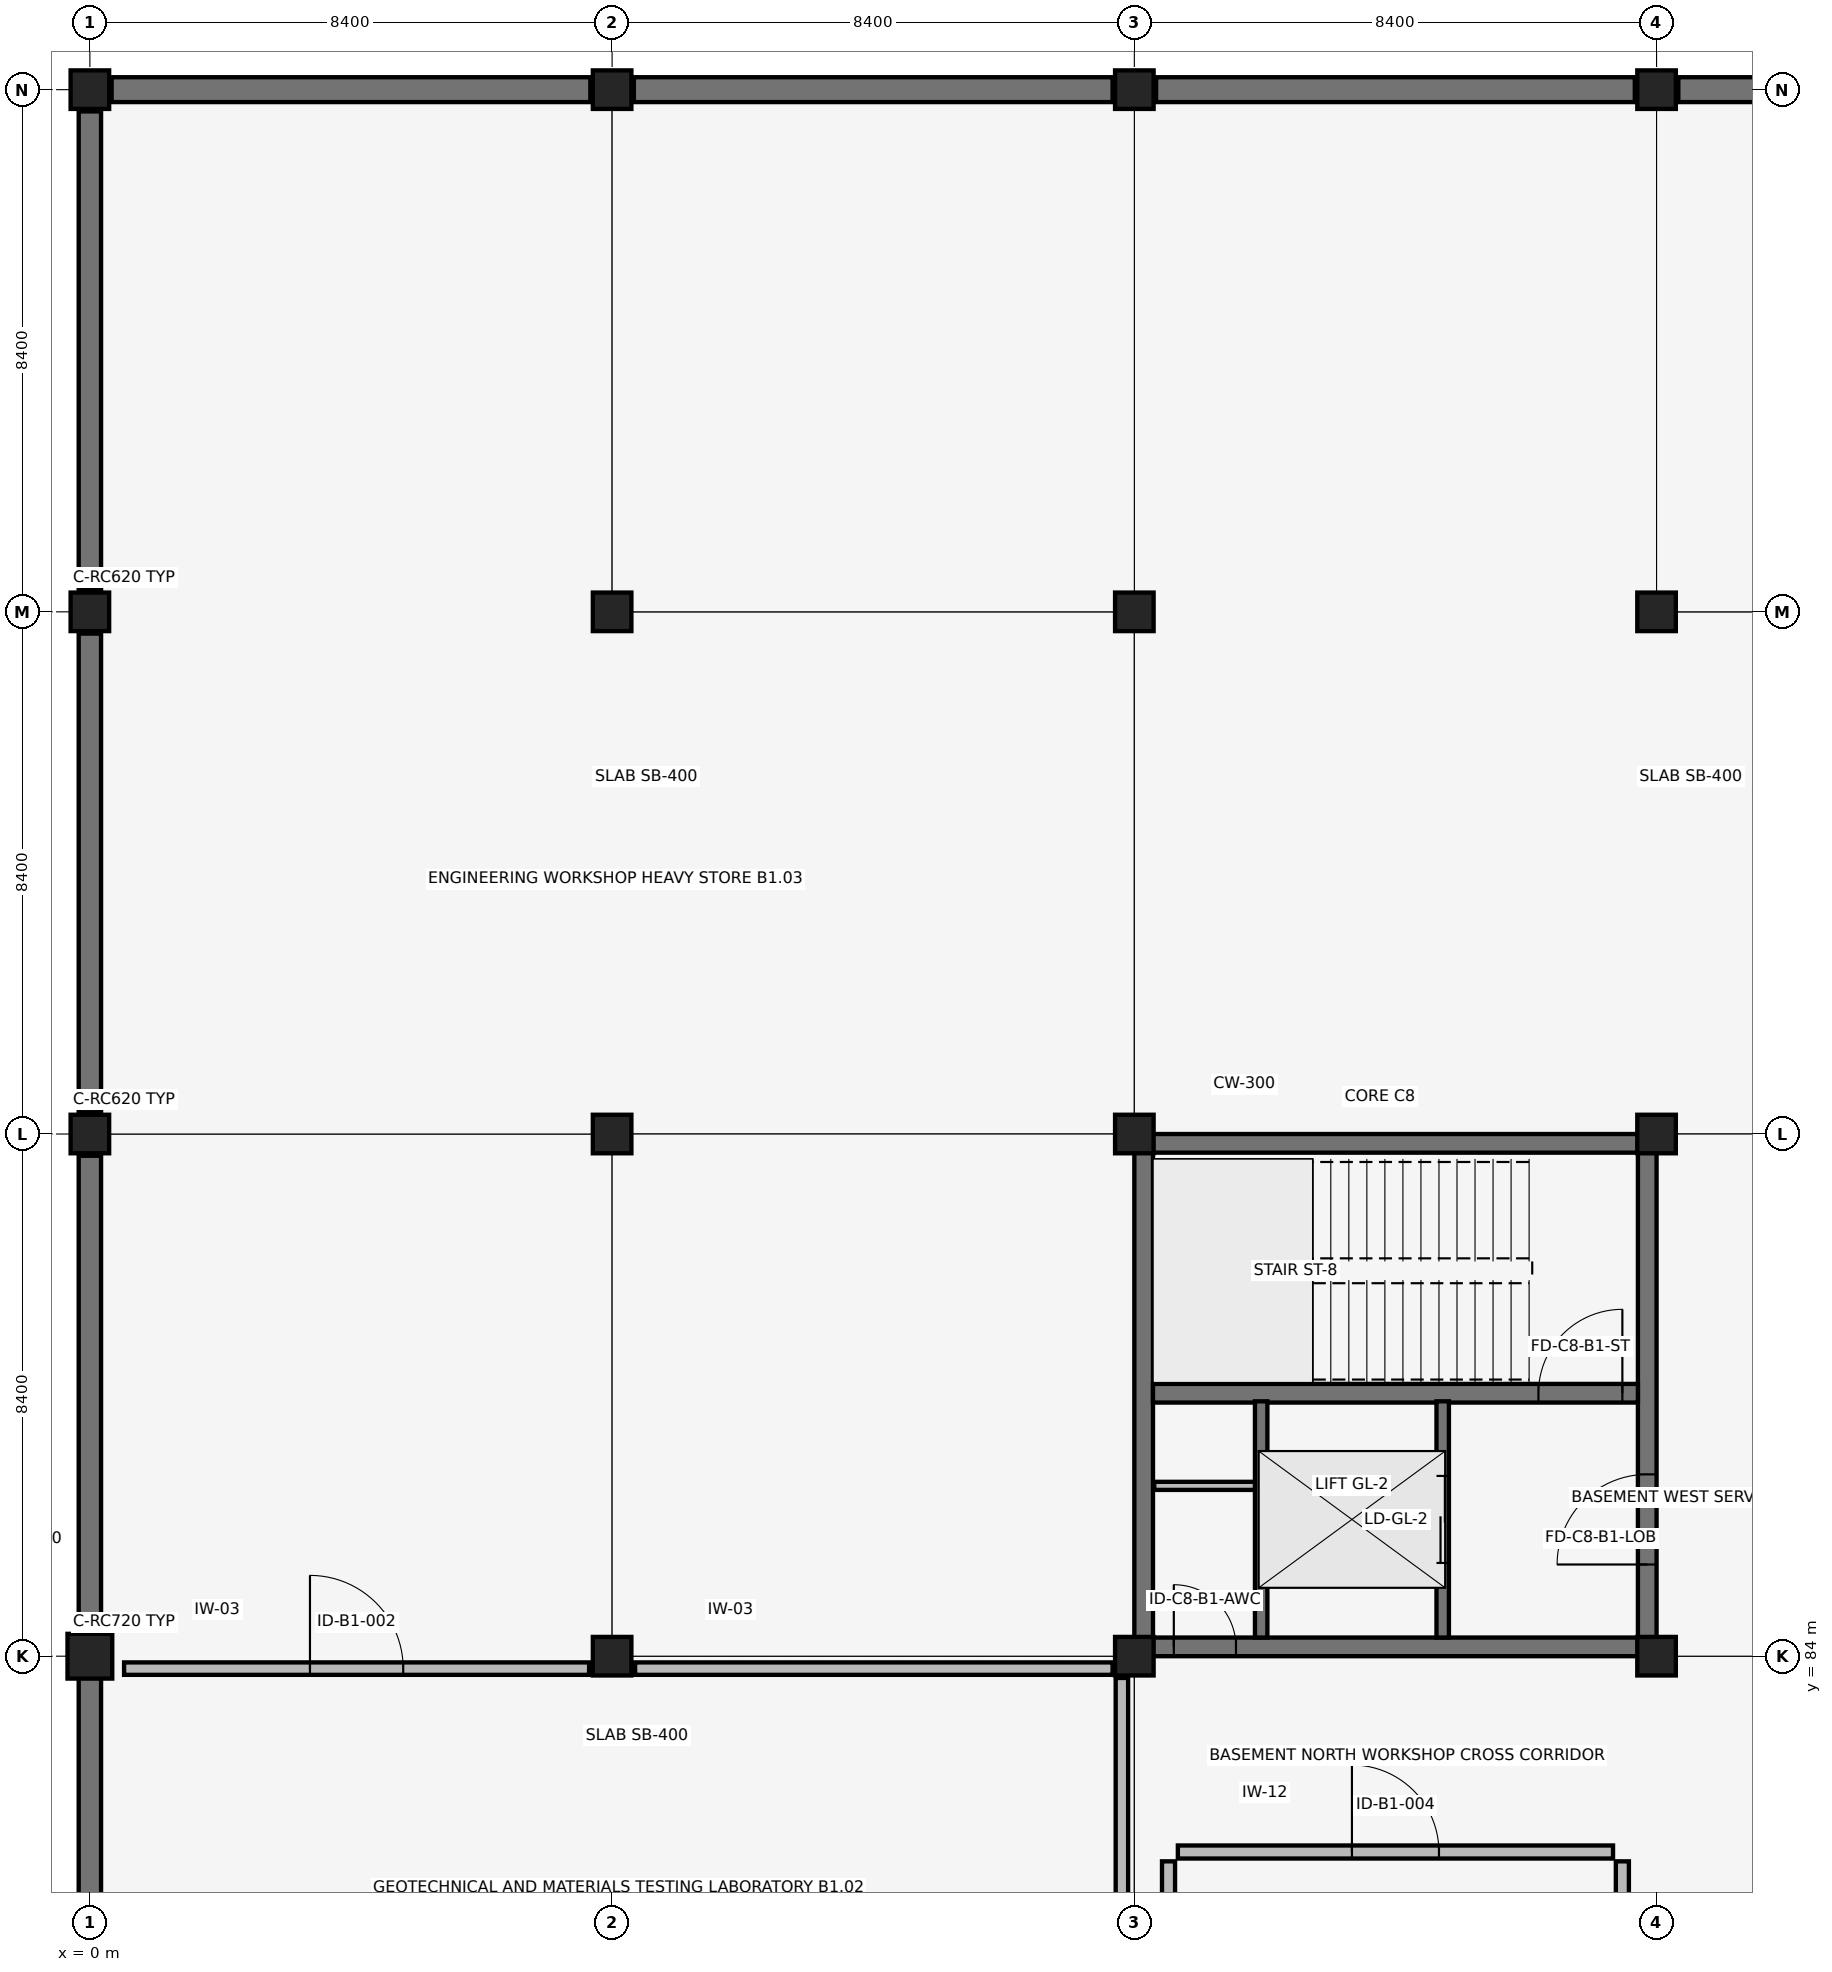
"""IFC4 building model, lengths in metres.
Left out: names, types, materials, properties, quantities, classifications, styles, units other than length and angle.
Written with IfcOpenShell. Run it as: python <this file> out.ifc"""

import sys

from ifc_helpers import new_model, si_unit, direction, frame, frame_2d, origin, origin_2d, place, context, subcontext, project, spatial, rectangle, extrude, element, fill, save


model = new_model("IFC4")
c1 = context("Model", 3, precision=1e-05, world=origin(), true_north=direction((0.0, 1.0)))
c2 = subcontext(c1, "Body", "Model", "MODEL_VIEW")
j1 = project(units=[si_unit("LENGTHUNIT", "METRE"), si_unit("PLANEANGLEUNIT", "RADIAN")], contexts=[c1])
p1 = place(None, origin())
s1 = spatial("IfcSite", under=j1, at=p1, CompositionType="ELEMENT")
p2 = place(p1, origin())
s2 = spatial("IfcBuilding", under=s1, at=p2, CompositionType="ELEMENT")
p3 = place(p2, frame((0.0, 0.0, -4.42)))
s3 = spatial("IfcBuildingStorey", under=s2, at=p3, CompositionType="ELEMENT", Elevation=-4.42)
for number, where, z_axis, x_axis in (
    (1, (0.0, 75.95, 0.0), (0.0, 0.0, 1.0), (0.0, 1.0, 0.0)),
    (2, (0.0, 84.35, 0.0), (0.0, 0.0, 1.0), (0.0, 1.0, 0.0)),
    (3, (0.0, 92.75, 0.0), (0.0, 0.0, 1.0), (0.0, 1.0, 0.0)),
):
    element("IfcWall", number, at=place(p3, frame(where, z_axis=z_axis, x_axis=x_axis)), inside=s3, PredefinedType="USERDEFINED", context=c2, shape_type="SweptSolid", body=[
        extrude(rectangle(XDim=7.7, YDim=0.36, at=frame_2d((3.85, 0.0))), origin(), (0.0, 0.0, 1.0), 4.12),
    ])
p4 = place(p3, frame((0.35, 109.2, 0.0), z_axis=(0.0, 0.0, 1.0), x_axis=(1.0, 0.0, 0.0)))
e4 = element("IfcWall", 4, at=p4, inside=s3, PredefinedType="USERDEFINED", context=c2, shape_type="SweptSolid", body=[
    extrude(rectangle(XDim=7.7, YDim=0.4, at=frame_2d((3.85, 0.0))), origin(), (0.0, 0.0, 1.0), 4.12),
])
p5 = place(p3, frame((0.0, 101.15, 0.0), z_axis=(0.0, 0.0, 1.0), x_axis=(0.0, 1.0, 0.0)))
e5 = element("IfcWall", 5, at=p5, inside=s3, PredefinedType="USERDEFINED", context=c2, shape_type="SweptSolid", body=[
    extrude(rectangle(XDim=7.7, YDim=0.36, at=frame_2d((3.85, 0.0))), origin(), (0.0, 0.0, 1.0), 4.12),
])
p6 = place(p3, frame((8.75, 109.2, 0.0), z_axis=(0.0, 0.0, 1.0), x_axis=(1.0, 0.0, 0.0)))
e6 = element("IfcWall", 6, at=p6, inside=s3, PredefinedType="USERDEFINED", context=c2, shape_type="SweptSolid", body=[
    extrude(rectangle(XDim=7.7, YDim=0.4, at=frame_2d((3.85, 0.0))), origin(), (0.0, 0.0, 1.0), 4.12),
])
p7 = place(p3, frame((17.15, 109.2, 0.0), z_axis=(0.0, 0.0, 1.0), x_axis=(1.0, 0.0, 0.0)))
e7 = element("IfcWall", 7, at=p7, inside=s3, PredefinedType="USERDEFINED", context=c2, shape_type="SweptSolid", body=[
    extrude(rectangle(XDim=7.7, YDim=0.4, at=frame_2d((3.85, 0.0))), origin(), (0.0, 0.0, 1.0), 4.12),
])
p8 = place(p3, frame((25.55, 109.2, 0.0), z_axis=(0.0, 0.0, 1.0), x_axis=(1.0, 0.0, 0.0)))
e8 = element("IfcWall", 8, at=p8, inside=s3, PredefinedType="USERDEFINED", context=c2, shape_type="SweptSolid", body=[
    extrude(rectangle(XDim=7.7, YDim=0.4, at=frame_2d((3.85, 0.0))), origin(), (0.0, 0.0, 1.0), 4.12),
])
p9 = place(p3, frame((16.95, 84.15, 0.0), z_axis=(0.0, 0.0, 1.0), x_axis=(1.0, 0.0, 0.0)))
e9 = element("IfcWall", 9, at=p9, inside=s3, PredefinedType="SHEAR", context=c2, shape_type="SweptSolid", body=[
    extrude(rectangle(XDim=8.1, YDim=0.3, at=frame_2d((4.05, 0.0))), origin(), (0.0, 0.0, 1.0), 4.12),
])
p10 = place(p9, frame((0.485, 0.0, 0.0)))
e10 = element("IfcOpeningElement", 10, at=p10, cuts=e9, PredefinedType="OPENING", context=c2, shape_type="SweptSolid", body=[
    extrude(rectangle(XDim=1.0, YDim=2.15, at=frame_2d((0.5, 1.075))), frame((0.0, 0.16, 0.0), z_axis=(0.0, -1.0, 0.0), x_axis=(1.0, 0.0, 0.0)), (0.0, 0.0, 1.0), 0.32),
])
for number, where, z_axis, x_axis in (
    (11, (16.95, 92.25, 0.0), (0.0, 0.0, 1.0), (1.0, 0.0, 0.0)),
    (12, (16.95, 84.15, 0.0), (0.0, 0.0, 1.0), (0.0, 1.0, 0.0)),
):
    element("IfcWall", number, at=place(p3, frame(where, z_axis=z_axis, x_axis=x_axis)), inside=s3, PredefinedType="SHEAR", context=c2, shape_type="SweptSolid", body=[
        extrude(rectangle(XDim=8.1, YDim=0.3, at=frame_2d((4.05, 0.0))), origin(), (0.0, 0.0, 1.0), 4.12),
    ])
p11 = place(p3, frame((25.05, 84.15, 0.0), z_axis=(0.0, 0.0, 1.0), x_axis=(0.0, 1.0, 0.0)))
e13 = element("IfcWall", 13, at=p11, inside=s3, PredefinedType="SHEAR", context=c2, shape_type="SweptSolid", body=[
    extrude(rectangle(XDim=8.1, YDim=0.3, at=frame_2d((4.05, 0.0))), origin(), (0.0, 0.0, 1.0), 4.12),
])
p12 = place(p11, frame((1.325, 0.0, 0.0)))
e14 = element("IfcOpeningElement", 14, at=p12, cuts=e13, PredefinedType="OPENING", context=c2, shape_type="SweptSolid", body=[
    extrude(rectangle(XDim=1.45, YDim=2.15, at=frame_2d((0.725, 1.075))), frame((0.0, 0.16, 0.0), z_axis=(0.0, -1.0, 0.0), x_axis=(1.0, 0.0, 0.0)), (0.0, 0.0, 1.0), 0.32),
])
p13 = place(p3, frame((17.1, 88.23, 0.0), z_axis=(0.0, 0.0, 1.0), x_axis=(1.0, 0.0, 0.0)))
e15 = element("IfcWall", 15, at=p13, inside=s3, PredefinedType="SHEAR", context=c2, shape_type="SweptSolid", body=[
    extrude(rectangle(XDim=7.8, YDim=0.3, at=frame_2d((3.9, 0.0))), origin(), (0.0, 0.0, 1.0), 4.12),
])
p14 = place(p13, frame((6.2, 0.0, 0.0)))
e16 = element("IfcOpeningElement", 16, at=p14, cuts=e15, PredefinedType="OPENING", context=c2, shape_type="SweptSolid", body=[
    extrude(rectangle(XDim=1.35, YDim=2.15, at=frame_2d((0.675, 1.075))), frame((0.0, 0.16, 0.0), z_axis=(0.0, -1.0, 0.0), x_axis=(1.0, 0.0, 0.0)), (0.0, 0.0, 1.0), 0.32),
])
p15 = place(p3, frame((0.0, 84.0, -0.4), z_axis=(0.0, 0.0, 1.0), x_axis=(1.0, 0.0, 0.0)))
e17 = element("IfcColumn", 17, at=p15, inside=s3, PredefinedType="COLUMN", context=c2, shape_type="SweptSolid", body=[
    extrude(rectangle(XDim=0.72, YDim=0.72, at=origin_2d()), origin(), (0.0, 0.0, 1.0), 4.52),
])
for number, where, z_axis, x_axis in (
    (18, (0.0, 92.4, -0.4), (0.0, 0.0, 1.0), (1.0, 0.0, 0.0)),
    (19, (0.0, 100.8, -0.4), (0.0, 0.0, 1.0), (1.0, 0.0, 0.0)),
    (20, (0.0, 109.2, -0.4), (0.0, 0.0, 1.0), (1.0, 0.0, 0.0)),
    (21, (8.4, 84.0, -0.4), (0.0, 0.0, 1.0), (1.0, 0.0, 0.0)),
    (22, (8.4, 92.4, -0.4), (0.0, 0.0, 1.0), (1.0, 0.0, 0.0)),
    (23, (8.4, 100.8, -0.4), (0.0, 0.0, 1.0), (1.0, 0.0, 0.0)),
    (24, (8.4, 109.2, -0.4), (0.0, 0.0, 1.0), (1.0, 0.0, 0.0)),
    (25, (16.8, 84.0, -0.4), (0.0, 0.0, 1.0), (1.0, 0.0, 0.0)),
    (26, (16.8, 92.4, -0.4), (0.0, 0.0, 1.0), (1.0, 0.0, 0.0)),
    (27, (16.8, 100.8, -0.4), (0.0, 0.0, 1.0), (1.0, 0.0, 0.0)),
    (28, (16.8, 109.2, -0.4), (0.0, 0.0, 1.0), (1.0, 0.0, 0.0)),
    (29, (25.2, 84.0, -0.4), (0.0, 0.0, 1.0), (1.0, 0.0, 0.0)),
    (30, (25.2, 92.4, -0.4), (0.0, 0.0, 1.0), (1.0, 0.0, 0.0)),
    (31, (25.2, 100.8, -0.4), (0.0, 0.0, 1.0), (1.0, 0.0, 0.0)),
    (32, (25.2, 109.2, -0.4), (0.0, 0.0, 1.0), (1.0, 0.0, 0.0)),
):
    element("IfcColumn", number, at=place(p3, frame(where, z_axis=z_axis, x_axis=x_axis)), inside=s3, PredefinedType="COLUMN", context=c2, shape_type="SweptSolid", body=[
        extrude(rectangle(XDim=0.62, YDim=0.62, at=origin_2d()), origin(), (0.0, 0.0, 1.0), 4.52),
    ])
p16 = place(p3, frame((21.76, 84.3, 0.0), z_axis=(0.0, 0.0, 1.0), x_axis=(0.0, 1.0, 0.0)))
e33 = element("IfcWall", 33, at=p16, inside=s3, PredefinedType="SHEAR", context=c2, shape_type="SweptSolid", body=[
    extrude(rectangle(XDim=3.8, YDim=0.2, at=frame_2d((1.9, 0.0))), origin(), (0.0, 0.0, 1.0), 3.2),
])
p17 = place(p16, frame((1.2, 0.0, 0.0)))
e34 = element("IfcOpeningElement", 34, at=p17, cuts=e33, PredefinedType="OPENING", context=c2, shape_type="SweptSolid", body=[
    extrude(rectangle(XDim=1.4, YDim=2.2, at=frame_2d((0.7, 1.1))), frame((0.0, 0.11, 0.0), z_axis=(0.0, -1.0, 0.0), x_axis=(1.0, 0.0, 0.0)), (0.0, 0.0, 1.0), 0.22),
])
p18 = place(p3, frame((18.84, 84.3, 0.0), z_axis=(0.0, 0.0, 1.0), x_axis=(0.0, 1.0, 0.0)))
e35 = element("IfcWall", 35, at=p18, inside=s3, PredefinedType="SHEAR", context=c2, shape_type="SweptSolid", body=[
    extrude(rectangle(XDim=3.8, YDim=0.2, at=frame_2d((1.9, 0.0))), origin(), (0.0, 0.0, 1.0), 3.2),
])
p19 = place(p3, frame((17.12, 86.74, 0.0), z_axis=(0.0, 0.0, 1.0), x_axis=(1.0, 0.0, 0.0)))
e36 = element("IfcWall", 36, at=p19, inside=s3, PredefinedType="PARTITIONING", context=c2, shape_type="SweptSolid", body=[
    extrude(rectangle(XDim=1.62, YDim=0.13, at=frame_2d((0.81, 0.0))), origin(), (0.0, 0.0, 1.0), 3.28),
])
p20 = place(p3, frame((0.55, 83.8, 0.0), z_axis=(0.0, 0.0, 1.0), x_axis=(1.0, 0.0, 0.0)))
e37 = element("IfcWall", 37, at=p20, inside=s3, PredefinedType="PARTITIONING", context=c2, shape_type="SweptSolid", body=[
    extrude(rectangle(XDim=7.48, YDim=0.2, at=frame_2d((3.74, 0.0))), origin(), (0.0, 0.0, 1.0), 3.2),
])
p21 = place(p20, frame((2.99, 0.0, 0.0)))
e38 = element("IfcOpeningElement", 38, at=p21, cuts=e37, PredefinedType="OPENING", context=c2, shape_type="SweptSolid", body=[
    extrude(rectangle(XDim=1.5, YDim=2.2, at=frame_2d((0.75, 1.1))), frame((0.0, 0.11, 0.0), z_axis=(0.0, -1.0, 0.0), x_axis=(1.0, 0.0, 0.0)), (0.0, 0.0, 1.0), 0.22),
])
for number, where, z_axis, x_axis in (
    (39, (8.77, 83.8, 0.0), (0.0, 0.0, 1.0), (1.0, 0.0, 0.0)),
    (40, (16.6, 75.97, 0.0), (0.0, 0.0, 1.0), (0.0, 1.0, 0.0)),
):
    element("IfcWall", number, at=place(p3, frame(where, z_axis=z_axis, x_axis=x_axis)), inside=s3, PredefinedType="PARTITIONING", context=c2, shape_type="SweptSolid", body=[
        extrude(rectangle(XDim=7.68, YDim=0.2, at=frame_2d((3.84, 0.0))), origin(), (0.0, 0.0, 1.0), 3.2),
    ])
p22 = place(p3, frame((17.5, 80.85, 0.0), z_axis=(0.0, 0.0, 1.0), x_axis=(1.0, 0.0, 0.0)))
e41 = element("IfcWall", 41, at=p22, inside=s3, PredefinedType="PARTITIONING", context=c2, shape_type="SweptSolid", body=[
    extrude(rectangle(XDim=7.0, YDim=0.21, at=frame_2d((3.5, 0.0))), origin(), (0.0, 0.0, 1.0), 4.12),
])
p23 = place(p22, frame((2.8, 0.0, 0.0)))
e42 = element("IfcOpeningElement", 42, at=p23, cuts=e41, PredefinedType="OPENING", context=c2, shape_type="SweptSolid", body=[
    extrude(rectangle(XDim=1.4, YDim=2.2, at=frame_2d((0.7, 1.1))), frame((0.0, 0.115, 0.0), z_axis=(0.0, -1.0, 0.0), x_axis=(1.0, 0.0, 0.0)), (0.0, 0.0, 1.0), 0.23),
])
for number, where, z_axis, x_axis in (
    (43, (24.65, 59.4, 0.0), (0.0, 0.0, 1.0), (0.0, 1.0, 0.0)),
    (44, (17.35, 59.4, 0.0), (0.0, 0.0, 1.0), (0.0, 1.0, 0.0)),
):
    element("IfcWall", number, at=place(p3, frame(where, z_axis=z_axis, x_axis=x_axis)), inside=s3, PredefinedType="PARTITIONING", context=c2, shape_type="SweptSolid", body=[
        extrude(rectangle(XDim=21.3, YDim=0.21, at=frame_2d((10.65, 0.0))), origin(), (0.0, 0.0, 1.0), 3.2),
    ])
p24 = place(p14, origin())
e45 = element("IfcDoor", 45, at=p24, inside=s3, OperationType="SINGLE_SWING_RIGHT", PredefinedType="DOOR", context=c2, shape_type="SweptSolid", body=[
    extrude(rectangle(XDim=1.35, YDim=2.15, at=frame_2d((0.675, 1.075))), frame((0.0, 0.025, 0.0), z_axis=(0.0, -1.0, 0.0), x_axis=(1.0, 0.0, 0.0)), (0.0, 0.0, 1.0), 0.05),
])
fill(e16, e45)
p25 = place(p17, origin())
e46 = element("IfcDoor", 46, at=p25, inside=s3, OperationType="SLIDING_TO_LEFT", PredefinedType="DOOR", context=c2, shape_type="SweptSolid", body=[
    extrude(rectangle(XDim=1.4, YDim=2.2, at=frame_2d((0.7, 1.1))), frame((0.0, 0.025, 0.0), z_axis=(0.0, -1.0, 0.0), x_axis=(1.0, 0.0, 0.0)), (0.0, 0.0, 1.0), 0.05),
])
fill(e34, e46)
p26 = place(p12, origin())
e47 = element("IfcDoor", 47, at=p26, inside=s3, OperationType="DOUBLE_DOOR_SINGLE_SWING", PredefinedType="DOOR", context=c2, shape_type="SweptSolid", body=[
    extrude(rectangle(XDim=1.45, YDim=2.15, at=frame_2d((0.725, 1.075))), frame((0.0, 0.025, 0.0), z_axis=(0.0, -1.0, 0.0), x_axis=(1.0, 0.0, 0.0)), (0.0, 0.0, 1.0), 0.05),
])
fill(e14, e47)
p27 = place(p10, origin())
e48 = element("IfcDoor", 48, at=p27, inside=s3, OperationType="SINGLE_SWING_LEFT", PredefinedType="DOOR", context=c2, shape_type="SweptSolid", body=[
    extrude(rectangle(XDim=1.0, YDim=2.15, at=frame_2d((0.5, 1.075))), frame((0.0, 0.025, 0.0), z_axis=(0.0, -1.0, 0.0), x_axis=(1.0, 0.0, 0.0)), (0.0, 0.0, 1.0), 0.05),
])
fill(e10, e48)
p28 = place(p21, origin())
e49 = element("IfcDoor", 49, at=p28, inside=s3, OperationType="DOUBLE_DOOR_SINGLE_SWING", PredefinedType="DOOR", context=c2, shape_type="SweptSolid", body=[
    extrude(rectangle(XDim=1.5, YDim=2.2, at=frame_2d((0.75, 1.1))), frame((0.0, 0.025, 0.0), z_axis=(0.0, -1.0, 0.0), x_axis=(1.0, 0.0, 0.0)), (0.0, 0.0, 1.0), 0.05),
])
fill(e38, e49)
p29 = place(p23, origin())
e50 = element("IfcDoor", 50, at=p29, inside=s3, OperationType="DOUBLE_DOOR_SINGLE_SWING", PredefinedType="DOOR", context=c2, shape_type="SweptSolid", body=[
    extrude(rectangle(XDim=1.4, YDim=2.2, at=frame_2d((0.7, 1.1))), frame((0.0, 0.025, 0.0), z_axis=(0.0, -1.0, 0.0), x_axis=(1.0, 0.0, 0.0)), (0.0, 0.0, 1.0), 0.05),
])
fill(e42, e50)
save(model, sys.argv[1])
